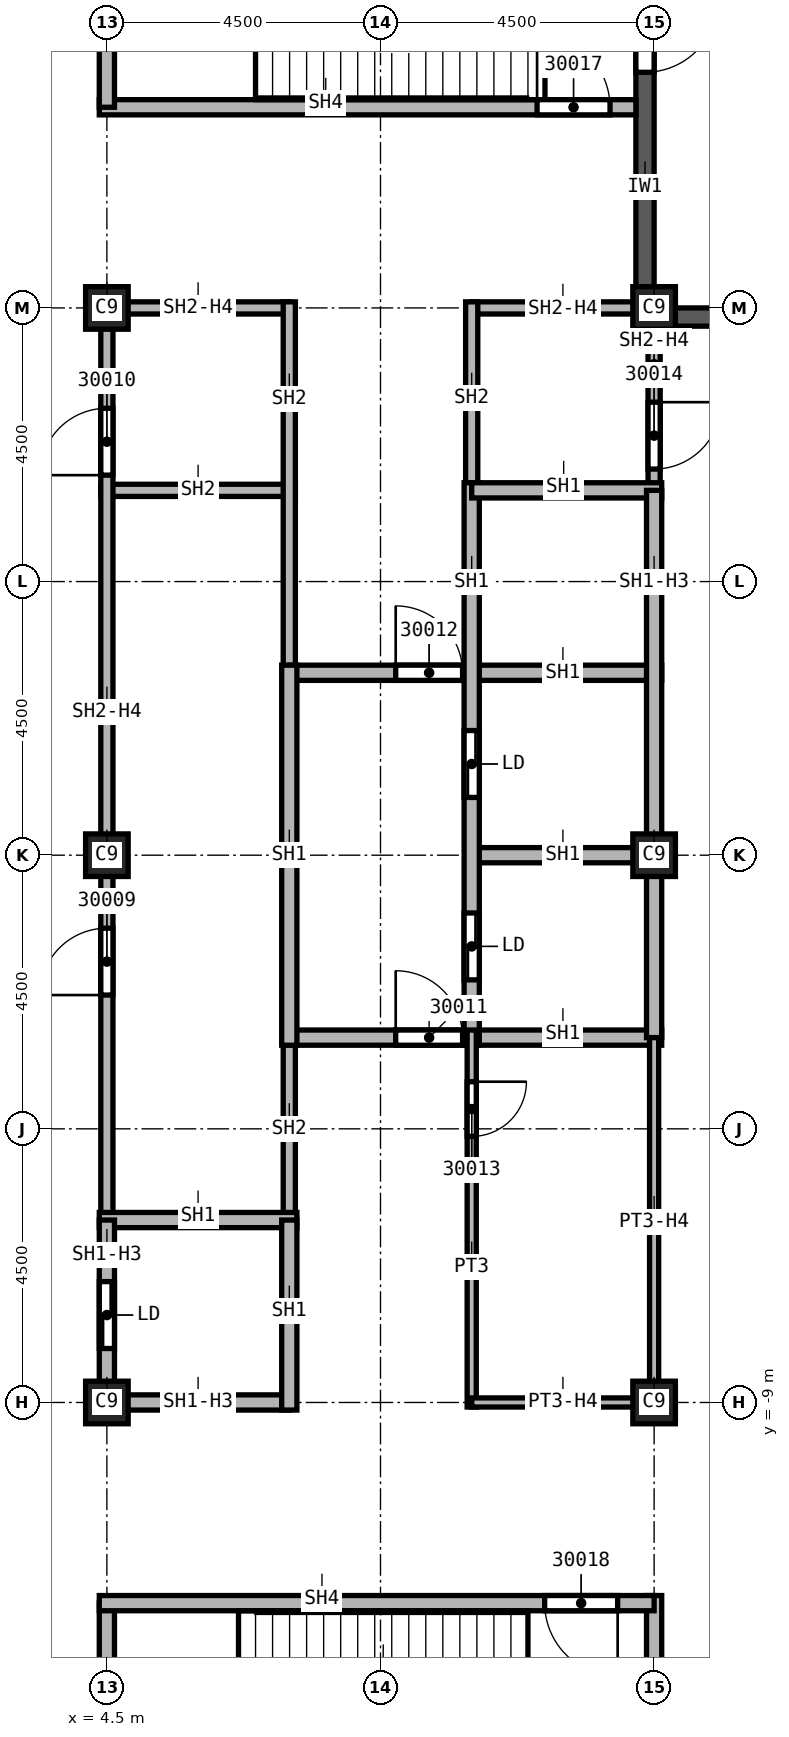
"""IFC4 building model, lengths in metres.
Left out: names, types, materials, properties, quantities, classifications, styles, units other than length and angle.
Written with IfcOpenShell. Run it as: python <this file> out.ifc"""

import sys

from ifc_helpers import new_model, si_unit, direction, frame, frame_2d, origin, origin_2d, place, context, subcontext, project, spatial, rectangle, extrude, element, fill, save


model = new_model("IFC4")
c1 = context("Model", 3, precision=1e-05, world=origin(), true_north=direction((0.0, 1.0)))
c2 = subcontext(c1, "Body", "Model", "MODEL_VIEW")
j1 = project(units=[si_unit("LENGTHUNIT", "METRE"), si_unit("PLANEANGLEUNIT", "RADIAN")], contexts=[c1])
p1 = place(None, origin())
s1 = spatial("IfcSite", under=j1, at=p1, CompositionType="ELEMENT")
p2 = place(p1, origin())
s2 = spatial("IfcBuilding", under=s1, at=p2, CompositionType="ELEMENT")
p3 = place(p2, frame((0.0, 0.0, 320.0)))
s3 = spatial("IfcBuildingStorey", under=s2, at=p3, CompositionType="ELEMENT", Elevation=320.0)
for number, where, z_axis, x_axis in (
    (1, (4.5, 0.0, 0.0), (0.0, 0.0, 1.0), (1.0, 0.0, 0.0)),
    (2, (4.5, 9.0, 0.0), (0.0, 0.0, 1.0), (1.0, 0.0, 0.0)),
    (3, (4.5, -9.0, 0.0), (0.0, 0.0, 1.0), (1.0, 0.0, 0.0)),
    (4, (13.5, 0.0, 0.0), (0.0, 0.0, 1.0), (1.0, 0.0, 0.0)),
    (5, (13.5, 9.0, 0.0), (0.0, 0.0, 1.0), (1.0, 0.0, 0.0)),
    (6, (13.5, -9.0, 0.0), (0.0, 0.0, 1.0), (1.0, 0.0, 0.0)),
):
    element("IfcColumn", number, at=place(p3, frame(where, z_axis=z_axis, x_axis=x_axis)), inside=s3, PredefinedType="COLUMN", context=c2, shape_type="SweptSolid", body=[
        extrude(rectangle(XDim=0.7, YDim=0.7, at=origin_2d()), origin(), (0.0, 0.0, 1.0), 5.74),
    ])
p4 = place(p3, frame((13.35, 17.6, 0.0), z_axis=(0.0, 0.0, 1.0), x_axis=(0.0, -1.0, 0.0)))
e7 = element("IfcWall", 7, at=p4, inside=s3, PredefinedType="SOLIDWALL", context=c2, shape_type="SweptSolid", body=[
    extrude(rectangle(XDim=8.55, YDim=0.3, at=frame_2d((4.275, 0.0))), origin(), (0.0, 0.0, 1.0), 5.14),
])
p5 = place(p4, frame((3.525, 0.0, 0.0)))
e8 = element("IfcOpeningElement", 8, at=p5, cuts=e7, PredefinedType="OPENING", context=c2, shape_type="SweptSolid", body=[
    extrude(rectangle(XDim=1.2, YDim=2.4, at=frame_2d((0.6, 1.2))), frame((0.0, 0.15, 0.0), z_axis=(0.0, -1.0, 0.0), x_axis=(1.0, 0.0, 0.0)), (0.0, 0.0, 1.0), 0.3),
])
p6 = place(p3, frame((22.1, 8.85, 0.0), z_axis=(0.0, 0.0, 1.0), x_axis=(-1.0, 0.0, 0.0)))
e9 = element("IfcWall", 9, at=p6, inside=s3, PredefinedType="SOLIDWALL", context=c2, shape_type="SweptSolid", body=[
    extrude(rectangle(XDim=8.55, YDim=0.3, at=frame_2d((4.275, 0.0))), origin(), (0.0, 0.0, 1.0), 5.14),
])
p7 = place(p3, frame((4.4, 6.0, 0.0), z_axis=(0.0, 0.0, 1.0), x_axis=(1.0, 0.0, 0.0)))
e10 = element("IfcWall", 10, at=p7, inside=s3, PredefinedType="SOLIDWALL", context=c2, shape_type="SweptSolid", body=[
    extrude(rectangle(XDim=3.2, YDim=0.2, at=frame_2d((1.6, 0.0))), origin(), (0.0, 0.0, 1.0), 5.74),
])
p8 = place(p3, frame((4.5, -6.0, 0.0), z_axis=(0.0, 0.0, 1.0), x_axis=(0.0, 1.0, 0.0)))
e11 = element("IfcWall", 11, at=p8, inside=s3, PredefinedType="SOLIDWALL", context=c2, shape_type="SweptSolid", body=[
    extrude(rectangle(XDim=15.1, YDim=0.2, at=frame_2d((7.55, 0.0))), origin(), (0.0, 0.0, 1.0), 5.062),
])
p9 = place(p8, frame((3.7, 0.0, 0.0)))
e12 = element("IfcOpeningElement", 12, at=p9, cuts=e11, PredefinedType="OPENING", context=c2, shape_type="SweptSolid", body=[
    extrude(rectangle(XDim=1.1, YDim=2.1, at=frame_2d((0.55, 1.05))), frame((0.0, 0.1, 0.0), z_axis=(0.0, -1.0, 0.0), x_axis=(1.0, 0.0, 0.0)), (0.0, 0.0, 1.0), 0.2),
])
p10 = place(p8, frame((12.25, 0.0, 0.0)))
e13 = element("IfcOpeningElement", 13, at=p10, cuts=e11, PredefinedType="OPENING", context=c2, shape_type="SweptSolid", body=[
    extrude(rectangle(XDim=1.1, YDim=2.1, at=frame_2d((0.55, 1.05))), frame((0.0, 0.1, 0.0), z_axis=(0.0, -1.0, 0.0), x_axis=(1.0, 0.0, 0.0)), (0.0, 0.0, 1.0), 0.2),
])
p11 = place(p3, frame((4.5, 9.0, 0.0), z_axis=(0.0, 0.0, 1.0), x_axis=(1.0, 0.0, 0.0)))
e14 = element("IfcWall", 14, at=p11, inside=s3, PredefinedType="SOLIDWALL", context=c2, shape_type="SweptSolid", body=[
    extrude(rectangle(XDim=3.0, YDim=0.2, at=frame_2d((1.5, 0.0))), origin(), (0.0, 0.0, 1.0), 5.062),
])
p12 = place(p3, frame((7.5, -2.875, 0.0), z_axis=(0.0, 0.0, 1.0), x_axis=(0.0, -1.0, 0.0)))
e15 = element("IfcWall", 15, at=p12, inside=s3, PredefinedType="SOLIDWALL", context=c2, shape_type="SweptSolid", body=[
    extrude(rectangle(XDim=3.125, YDim=0.2, at=frame_2d((1.562, 0.0))), origin(), (0.0, 0.0, 1.0), 5.74),
])
p13 = place(p3, frame((7.5, 9.1, 0.0), z_axis=(0.0, 0.0, 1.0), x_axis=(0.0, -1.0, 0.0)))
e16 = element("IfcWall", 16, at=p13, inside=s3, PredefinedType="SOLIDWALL", context=c2, shape_type="SweptSolid", body=[
    extrude(rectangle(XDim=6.225, YDim=0.2, at=frame_2d((3.113, 0.0))), origin(), (0.0, 0.0, 1.0), 5.74),
])
p14 = place(p3, frame((10.5, 9.0, 0.0), z_axis=(0.0, 0.0, 1.0), x_axis=(1.0, 0.0, 0.0)))
e17 = element("IfcWall", 17, at=p14, inside=s3, PredefinedType="SOLIDWALL", context=c2, shape_type="SweptSolid", body=[
    extrude(rectangle(XDim=3.0, YDim=0.2, at=frame_2d((1.5, 0.0))), origin(), (0.0, 0.0, 1.0), 5.062),
])
p15 = place(p3, frame((10.5, 9.1, 0.0), z_axis=(0.0, 0.0, 1.0), x_axis=(0.0, -1.0, 0.0)))
e18 = element("IfcWall", 18, at=p15, inside=s3, PredefinedType="SOLIDWALL", context=c2, shape_type="SweptSolid", body=[
    extrude(rectangle(XDim=3.225, YDim=0.2, at=frame_2d((1.613, 0.0))), origin(), (0.0, 0.0, 1.0), 5.74),
])
p16 = place(p3, frame((13.5, 9.05, 0.0), z_axis=(0.0, 0.0, 1.0), x_axis=(0.0, -1.0, 0.0)))
e19 = element("IfcWall", 19, at=p16, inside=s3, PredefinedType="SOLIDWALL", context=c2, shape_type="SweptSolid", body=[
    extrude(rectangle(XDim=3.05, YDim=0.2, at=frame_2d((1.525, 0.0))), origin(), (0.0, 0.0, 1.0), 5.062),
])
p17 = place(p16, frame((1.6, 0.0, 0.0)))
e20 = element("IfcOpeningElement", 20, at=p17, cuts=e19, PredefinedType="OPENING", context=c2, shape_type="SweptSolid", body=[
    extrude(rectangle(XDim=1.1, YDim=2.1, at=frame_2d((0.55, 1.05))), frame((0.0, 0.1, 0.0), z_axis=(0.0, -1.0, 0.0), x_axis=(1.0, 0.0, 0.0)), (0.0, 0.0, 1.0), 0.2),
])
p18 = place(p3, frame((4.375, -6.0, 0.0), z_axis=(0.0, 0.0, 1.0), x_axis=(1.0, 0.0, 0.0)))
e21 = element("IfcWall", 21, at=p18, inside=s3, PredefinedType="SOLIDWALL", context=c2, shape_type="SweptSolid", body=[
    extrude(rectangle(XDim=3.25, YDim=0.25, at=frame_2d((1.625, 0.0))), origin(), (0.0, 0.0, 1.0), 5.74),
])
p19 = place(p3, frame((4.5, -9.125, 0.0), z_axis=(0.0, 0.0, 1.0), x_axis=(0.0, 1.0, 0.0)))
e22 = element("IfcWall", 22, at=p19, inside=s3, PredefinedType="SOLIDWALL", context=c2, shape_type="SweptSolid", body=[
    extrude(rectangle(XDim=3.125, YDim=0.25, at=frame_2d((1.562, 0.0))), origin(), (0.0, 0.0, 1.0), 5.062),
])
p20 = place(p19, frame((1.012, 0.0, 0.0)))
e23 = element("IfcOpeningElement", 23, at=p20, cuts=e22, PredefinedType="OPENING", context=c2, shape_type="SweptSolid", body=[
    extrude(rectangle(XDim=1.1, YDim=2.1, at=frame_2d((0.55, 1.05))), frame((0.0, 0.125, 0.0), z_axis=(0.0, -1.0, 0.0), x_axis=(1.0, 0.0, 0.0)), (0.0, 0.0, 1.0), 0.25),
])
p21 = place(p3, frame((7.5, -9.0, 0.0), z_axis=(0.0, 0.0, 1.0), x_axis=(-1.0, 0.0, 0.0)))
e24 = element("IfcWall", 24, at=p21, inside=s3, PredefinedType="SOLIDWALL", context=c2, shape_type="SweptSolid", body=[
    extrude(rectangle(XDim=3.0, YDim=0.25, at=frame_2d((1.5, 0.0))), origin(), (0.0, 0.0, 1.0), 5.062),
])
p22 = place(p3, frame((7.5, -6.0, 0.0), z_axis=(0.0, 0.0, 1.0), x_axis=(0.0, -1.0, 0.0)))
e25 = element("IfcWall", 25, at=p22, inside=s3, PredefinedType="SOLIDWALL", context=c2, shape_type="SweptSolid", body=[
    extrude(rectangle(XDim=3.125, YDim=0.25, at=frame_2d((1.562, 0.0))), origin(), (0.0, 0.0, 1.0), 5.74),
])
p23 = place(p3, frame((7.5, -3.0, 0.0), z_axis=(0.0, 0.0, 1.0), x_axis=(1.0, 0.0, 0.0)))
e26 = element("IfcWall", 26, at=p23, inside=s3, PredefinedType="SOLIDWALL", context=c2, shape_type="SweptSolid", body=[
    extrude(rectangle(XDim=6.125, YDim=0.25, at=frame_2d((3.062, 0.0))), origin(), (0.0, 0.0, 1.0), 5.74),
])
p24 = place(p23, frame((1.75, 0.0, 0.0)))
e27 = element("IfcOpeningElement", 27, at=p24, cuts=e26, PredefinedType="OPENING", context=c2, shape_type="SweptSolid", body=[
    extrude(rectangle(XDim=1.1, YDim=2.1, at=frame_2d((0.55, 1.05))), frame((0.0, 0.125, 0.0), z_axis=(0.0, -1.0, 0.0), x_axis=(1.0, 0.0, 0.0)), (0.0, 0.0, 1.0), 0.25),
])
p25 = place(p3, frame((7.5, 3.0, 0.0), z_axis=(0.0, 0.0, 1.0), x_axis=(1.0, 0.0, 0.0)))
e28 = element("IfcWall", 28, at=p25, inside=s3, PredefinedType="SOLIDWALL", context=c2, shape_type="SweptSolid", body=[
    extrude(rectangle(XDim=6.125, YDim=0.25, at=frame_2d((3.062, 0.0))), origin(), (0.0, 0.0, 1.0), 5.74),
])
p26 = place(p25, frame((1.75, 0.0, 0.0)))
e29 = element("IfcOpeningElement", 29, at=p26, cuts=e28, PredefinedType="OPENING", context=c2, shape_type="SweptSolid", body=[
    extrude(rectangle(XDim=1.1, YDim=2.1, at=frame_2d((0.55, 1.05))), frame((0.0, 0.125, 0.0), z_axis=(0.0, -1.0, 0.0), x_axis=(1.0, 0.0, 0.0)), (0.0, 0.0, 1.0), 0.25),
])
p27 = place(p3, frame((7.5, 3.125, 0.0), z_axis=(0.0, 0.0, 1.0), x_axis=(0.0, -1.0, 0.0)))
e30 = element("IfcWall", 30, at=p27, inside=s3, PredefinedType="SOLIDWALL", context=c2, shape_type="SweptSolid", body=[
    extrude(rectangle(XDim=6.25, YDim=0.25, at=frame_2d((3.125, 0.0))), origin(), (0.0, 0.0, 1.0), 5.74),
])
p28 = place(p3, frame((10.5, 0.0, 0.0), z_axis=(0.0, 0.0, 1.0), x_axis=(1.0, 0.0, 0.0)))
e31 = element("IfcWall", 31, at=p28, inside=s3, PredefinedType="SOLIDWALL", context=c2, shape_type="SweptSolid", body=[
    extrude(rectangle(XDim=3.125, YDim=0.25, at=frame_2d((1.562, 0.0))), origin(), (0.0, 0.0, 1.0), 5.74),
])
p29 = place(p3, frame((10.5, 6.125, 0.0), z_axis=(0.0, 0.0, 1.0), x_axis=(0.0, -1.0, 0.0)))
e32 = element("IfcWall", 32, at=p29, inside=s3, PredefinedType="SOLIDWALL", context=c2, shape_type="SweptSolid", body=[
    extrude(rectangle(XDim=9.25, YDim=0.25, at=frame_2d((4.625, 0.0))), origin(), (0.0, 0.0, 1.0), 5.74),
])
p30 = place(p29, frame((7.075, 0.0, 0.0)))
e33 = element("IfcOpeningElement", 33, at=p30, cuts=e32, PredefinedType="OPENING", context=c2, shape_type="SweptSolid", body=[
    extrude(rectangle(XDim=1.1, YDim=2.1, at=frame_2d((0.55, 1.05))), frame((0.0, 0.125, 0.0), z_axis=(0.0, -1.0, 0.0), x_axis=(1.0, 0.0, 0.0)), (0.0, 0.0, 1.0), 0.25),
])
p31 = place(p29, frame((4.075, 0.0, 0.0)))
e34 = element("IfcOpeningElement", 34, at=p31, cuts=e32, PredefinedType="OPENING", context=c2, shape_type="SweptSolid", body=[
    extrude(rectangle(XDim=1.1, YDim=2.1, at=frame_2d((0.55, 1.05))), frame((0.0, 0.125, 0.0), z_axis=(0.0, -1.0, 0.0), x_axis=(1.0, 0.0, 0.0)), (0.0, 0.0, 1.0), 0.25),
])
p32 = place(p3, frame((10.5, 6.0, 0.0), z_axis=(0.0, 0.0, 1.0), x_axis=(1.0, 0.0, 0.0)))
e35 = element("IfcWall", 35, at=p32, inside=s3, PredefinedType="SOLIDWALL", context=c2, shape_type="SweptSolid", body=[
    extrude(rectangle(XDim=3.125, YDim=0.25, at=frame_2d((1.562, 0.0))), origin(), (0.0, 0.0, 1.0), 5.74),
])
p33 = place(p3, frame((13.5, 6.0, 0.0), z_axis=(0.0, 0.0, 1.0), x_axis=(0.0, -1.0, 0.0)))
e36 = element("IfcWall", 36, at=p33, inside=s3, PredefinedType="SOLIDWALL", context=c2, shape_type="SweptSolid", body=[
    extrude(rectangle(XDim=9.0, YDim=0.25, at=frame_2d((4.5, 0.0))), origin(), (0.0, 0.0, 1.0), 5.062),
])
p34 = place(p3, frame((4.375, 12.3, 0.0), z_axis=(0.0, 0.0, 1.0), x_axis=(1.0, 0.0, 0.0)))
e37 = element("IfcWall", 37, at=p34, inside=s3, PredefinedType="SOLIDWALL", context=c2, shape_type="SweptSolid", body=[
    extrude(rectangle(XDim=8.825, YDim=0.25, at=frame_2d((4.413, 0.0))), origin(), (0.0, 0.0, 1.0), 5.74),
])
p35 = place(p34, frame((7.2, 0.0, 0.0)))
e38 = element("IfcOpeningElement", 38, at=p35, cuts=e37, PredefinedType="OPENING", context=c2, shape_type="SweptSolid", body=[
    extrude(rectangle(XDim=1.2, YDim=2.1, at=frame_2d((0.6, 1.05))), frame((0.0, 0.125, 0.0), z_axis=(0.0, -1.0, 0.0), x_axis=(1.0, 0.0, 0.0)), (0.0, 0.0, 1.0), 0.25),
])
p36 = place(p3, frame((4.5, -16.8, 0.0), z_axis=(0.0, 0.0, 1.0), x_axis=(0.0, 1.0, 0.0)))
e39 = element("IfcWall", 39, at=p36, inside=s3, PredefinedType="SOLIDWALL", context=c2, shape_type="SweptSolid", body=[
    extrude(rectangle(XDim=4.5, YDim=0.25, at=frame_2d((2.25, 0.0))), origin(), (0.0, 0.0, 1.0), 5.74),
])
p37 = place(p3, frame((4.5, 12.3, 0.0), z_axis=(0.0, 0.0, 1.0), x_axis=(0.0, 1.0, 0.0)))
e40 = element("IfcWall", 40, at=p37, inside=s3, PredefinedType="SOLIDWALL", context=c2, shape_type="SweptSolid", body=[
    extrude(rectangle(XDim=4.625, YDim=0.25, at=frame_2d((2.312, 0.0))), origin(), (0.0, 0.0, 1.0), 5.74),
])
p38 = place(p3, frame((13.5, -16.925, 0.0), z_axis=(0.0, 0.0, 1.0), x_axis=(0.0, 1.0, 0.0)))
e41 = element("IfcWall", 41, at=p38, inside=s3, PredefinedType="SOLIDWALL", context=c2, shape_type="SweptSolid", body=[
    extrude(rectangle(XDim=4.75, YDim=0.25, at=frame_2d((2.375, 0.0))), origin(), (0.0, 0.0, 1.0), 5.74),
])
p39 = place(p3, frame((13.5, -12.3, 0.0), z_axis=(0.0, 0.0, 1.0), x_axis=(-1.0, 0.0, 0.0)))
e42 = element("IfcWall", 42, at=p39, inside=s3, PredefinedType="SOLIDWALL", context=c2, shape_type="SweptSolid", body=[
    extrude(rectangle(XDim=9.125, YDim=0.25, at=frame_2d((4.562, 0.0))), origin(), (0.0, 0.0, 1.0), 5.74),
])
p40 = place(p39, frame((0.6, 0.0, 0.0)))
e43 = element("IfcOpeningElement", 43, at=p40, cuts=e42, PredefinedType="OPENING", context=c2, shape_type="SweptSolid", body=[
    extrude(rectangle(XDim=1.2, YDim=2.1, at=frame_2d((0.6, 1.05))), frame((0.0, 0.125, 0.0), z_axis=(0.0, -1.0, 0.0), x_axis=(1.0, 0.0, 0.0)), (0.0, 0.0, 1.0), 0.25),
])
p41 = place(p3, frame((10.5, -2.875, 0.0), z_axis=(0.0, 0.0, 1.0), x_axis=(0.0, -1.0, 0.0)))
e44 = element("IfcWall", 44, at=p41, inside=s3, PredefinedType="PARTITIONING", context=c2, shape_type="SweptSolid", body=[
    extrude(rectangle(XDim=6.2, YDim=0.15, at=frame_2d((3.1, 0.0))), origin(), (0.0, 0.0, 1.0), 5.74),
])
p42 = place(p41, frame((0.85, 0.0, 0.0)))
e45 = element("IfcOpeningElement", 45, at=p42, cuts=e44, PredefinedType="OPENING", context=c2, shape_type="SweptSolid", body=[
    extrude(rectangle(XDim=0.9, YDim=2.1, at=frame_2d((0.45, 1.05))), frame((0.0, 0.075, 0.0), z_axis=(0.0, -1.0, 0.0), x_axis=(1.0, 0.0, 0.0)), (0.0, 0.0, 1.0), 0.15),
])
p43 = place(p3, frame((13.5, -9.0, 0.0), z_axis=(0.0, 0.0, 1.0), x_axis=(-1.0, 0.0, 0.0)))
e46 = element("IfcWall", 46, at=p43, inside=s3, PredefinedType="PARTITIONING", context=c2, shape_type="SweptSolid", body=[
    extrude(rectangle(XDim=3.0, YDim=0.15, at=frame_2d((1.5, 0.0))), origin(), (0.0, 0.0, 1.0), 5.062),
])
p44 = place(p3, frame((13.5, -3.0, 0.0), z_axis=(0.0, 0.0, 1.0), x_axis=(0.0, -1.0, 0.0)))
e47 = element("IfcWall", 47, at=p44, inside=s3, PredefinedType="PARTITIONING", context=c2, shape_type="SweptSolid", body=[
    extrude(rectangle(XDim=6.075, YDim=0.15, at=frame_2d((3.038, 0.0))), origin(), (0.0, 0.0, 1.0), 5.062),
])
p45 = place(p5, origin())
e48 = element("IfcDoor", 48, at=p45, inside=s3, OperationType="SINGLE_SWING_LEFT", PredefinedType="DOOR", context=c2, shape_type="SweptSolid", body=[
    extrude(rectangle(XDim=1.2, YDim=2.4, at=frame_2d((0.6, 1.2))), frame((0.0, 0.025, 0.0), z_axis=(0.0, -1.0, 0.0), x_axis=(1.0, 0.0, 0.0)), (0.0, 0.0, 1.0), 0.05),
])
fill(e8, e48)
p46 = place(p9, origin())
e49 = element("IfcDoor", 49, at=p46, inside=s3, OperationType="SINGLE_SWING_RIGHT", PredefinedType="DOOR", context=c2, shape_type="SweptSolid", body=[
    extrude(rectangle(XDim=1.1, YDim=2.1, at=frame_2d((0.55, 1.05))), frame((0.0, 0.025, 0.0), z_axis=(0.0, -1.0, 0.0), x_axis=(1.0, 0.0, 0.0)), (0.0, 0.0, 1.0), 0.05),
])
fill(e12, e49)
p47 = place(p10, origin())
e50 = element("IfcDoor", 50, at=p47, inside=s3, OperationType="SINGLE_SWING_LEFT", PredefinedType="DOOR", context=c2, shape_type="SweptSolid", body=[
    extrude(rectangle(XDim=1.1, YDim=2.1, at=frame_2d((0.55, 1.05))), frame((0.0, 0.025, 0.0), z_axis=(0.0, -1.0, 0.0), x_axis=(1.0, 0.0, 0.0)), (0.0, 0.0, 1.0), 0.05),
])
fill(e13, e50)
p48 = place(p24, origin())
e51 = element("IfcDoor", 51, at=p48, inside=s3, OperationType="SINGLE_SWING_RIGHT", PredefinedType="DOOR", context=c2, shape_type="SweptSolid", body=[
    extrude(rectangle(XDim=1.1, YDim=2.1, at=frame_2d((0.55, 1.05))), frame((0.0, 0.025, 0.0), z_axis=(0.0, -1.0, 0.0), x_axis=(1.0, 0.0, 0.0)), (0.0, 0.0, 1.0), 0.05),
])
fill(e27, e51)
p49 = place(p26, origin())
e52 = element("IfcDoor", 52, at=p49, inside=s3, OperationType="SINGLE_SWING_LEFT", PredefinedType="DOOR", context=c2, shape_type="SweptSolid", body=[
    extrude(rectangle(XDim=1.1, YDim=2.1, at=frame_2d((0.55, 1.05))), frame((0.0, 0.025, 0.0), z_axis=(0.0, -1.0, 0.0), x_axis=(1.0, 0.0, 0.0)), (0.0, 0.0, 1.0), 0.05),
])
fill(e29, e52)
p50 = place(p42, origin())
e53 = element("IfcDoor", 53, at=p50, inside=s3, OperationType="SINGLE_SWING_RIGHT", PredefinedType="DOOR", context=c2, shape_type="SweptSolid", body=[
    extrude(rectangle(XDim=0.9, YDim=2.1, at=frame_2d((0.45, 1.05))), frame((0.0, 0.025, 0.0), z_axis=(0.0, -1.0, 0.0), x_axis=(1.0, 0.0, 0.0)), (0.0, 0.0, 1.0), 0.05),
])
fill(e45, e53)
p51 = place(p17, origin())
e54 = element("IfcDoor", 54, at=p51, inside=s3, OperationType="SINGLE_SWING_LEFT", PredefinedType="DOOR", context=c2, shape_type="SweptSolid", body=[
    extrude(rectangle(XDim=1.1, YDim=2.1, at=frame_2d((0.55, 1.05))), frame((0.0, 0.025, 0.0), z_axis=(0.0, -1.0, 0.0), x_axis=(1.0, 0.0, 0.0)), (0.0, 0.0, 1.0), 0.05),
])
fill(e20, e54)
p52 = place(p35, origin())
e55 = element("IfcDoor", 55, at=p52, inside=s3, OperationType="SINGLE_SWING_RIGHT", PredefinedType="DOOR", context=c2, shape_type="SweptSolid", body=[
    extrude(rectangle(XDim=1.2, YDim=2.1, at=frame_2d((0.6, 1.05))), frame((0.0, 0.025, 0.0), z_axis=(0.0, -1.0, 0.0), x_axis=(1.0, 0.0, 0.0)), (0.0, 0.0, 1.0), 0.05),
])
fill(e38, e55)
p53 = place(p40, origin())
e56 = element("IfcDoor", 56, at=p53, inside=s3, OperationType="SINGLE_SWING_LEFT", PredefinedType="DOOR", context=c2, shape_type="SweptSolid", body=[
    extrude(rectangle(XDim=1.2, YDim=2.1, at=frame_2d((0.6, 1.05))), frame((0.0, 0.025, 0.0), z_axis=(0.0, -1.0, 0.0), x_axis=(1.0, 0.0, 0.0)), (0.0, 0.0, 1.0), 0.05),
])
fill(e43, e56)
p54 = place(p20, origin())
e57 = element("IfcDoor", 57, at=p54, inside=s3, OperationType="SLIDING_TO_LEFT", PredefinedType="DOOR", context=c2, shape_type="SweptSolid", body=[
    extrude(rectangle(XDim=1.1, YDim=2.1, at=frame_2d((0.55, 1.05))), frame((0.0, 0.025, 0.0), z_axis=(0.0, -1.0, 0.0), x_axis=(1.0, 0.0, 0.0)), (0.0, 0.0, 1.0), 0.05),
])
fill(e23, e57)
p55 = place(p30, origin())
e58 = element("IfcDoor", 58, at=p55, inside=s3, OperationType="SLIDING_TO_LEFT", PredefinedType="DOOR", context=c2, shape_type="SweptSolid", body=[
    extrude(rectangle(XDim=1.1, YDim=2.1, at=frame_2d((0.55, 1.05))), frame((0.0, 0.025, 0.0), z_axis=(0.0, -1.0, 0.0), x_axis=(1.0, 0.0, 0.0)), (0.0, 0.0, 1.0), 0.05),
])
fill(e33, e58)
p56 = place(p31, origin())
e59 = element("IfcDoor", 59, at=p56, inside=s3, OperationType="SLIDING_TO_LEFT", PredefinedType="DOOR", context=c2, shape_type="SweptSolid", body=[
    extrude(rectangle(XDim=1.1, YDim=2.1, at=frame_2d((0.55, 1.05))), frame((0.0, 0.025, 0.0), z_axis=(0.0, -1.0, 0.0), x_axis=(1.0, 0.0, 0.0)), (0.0, 0.0, 1.0), 0.05),
])
fill(e34, e59)
save(model, sys.argv[1])
